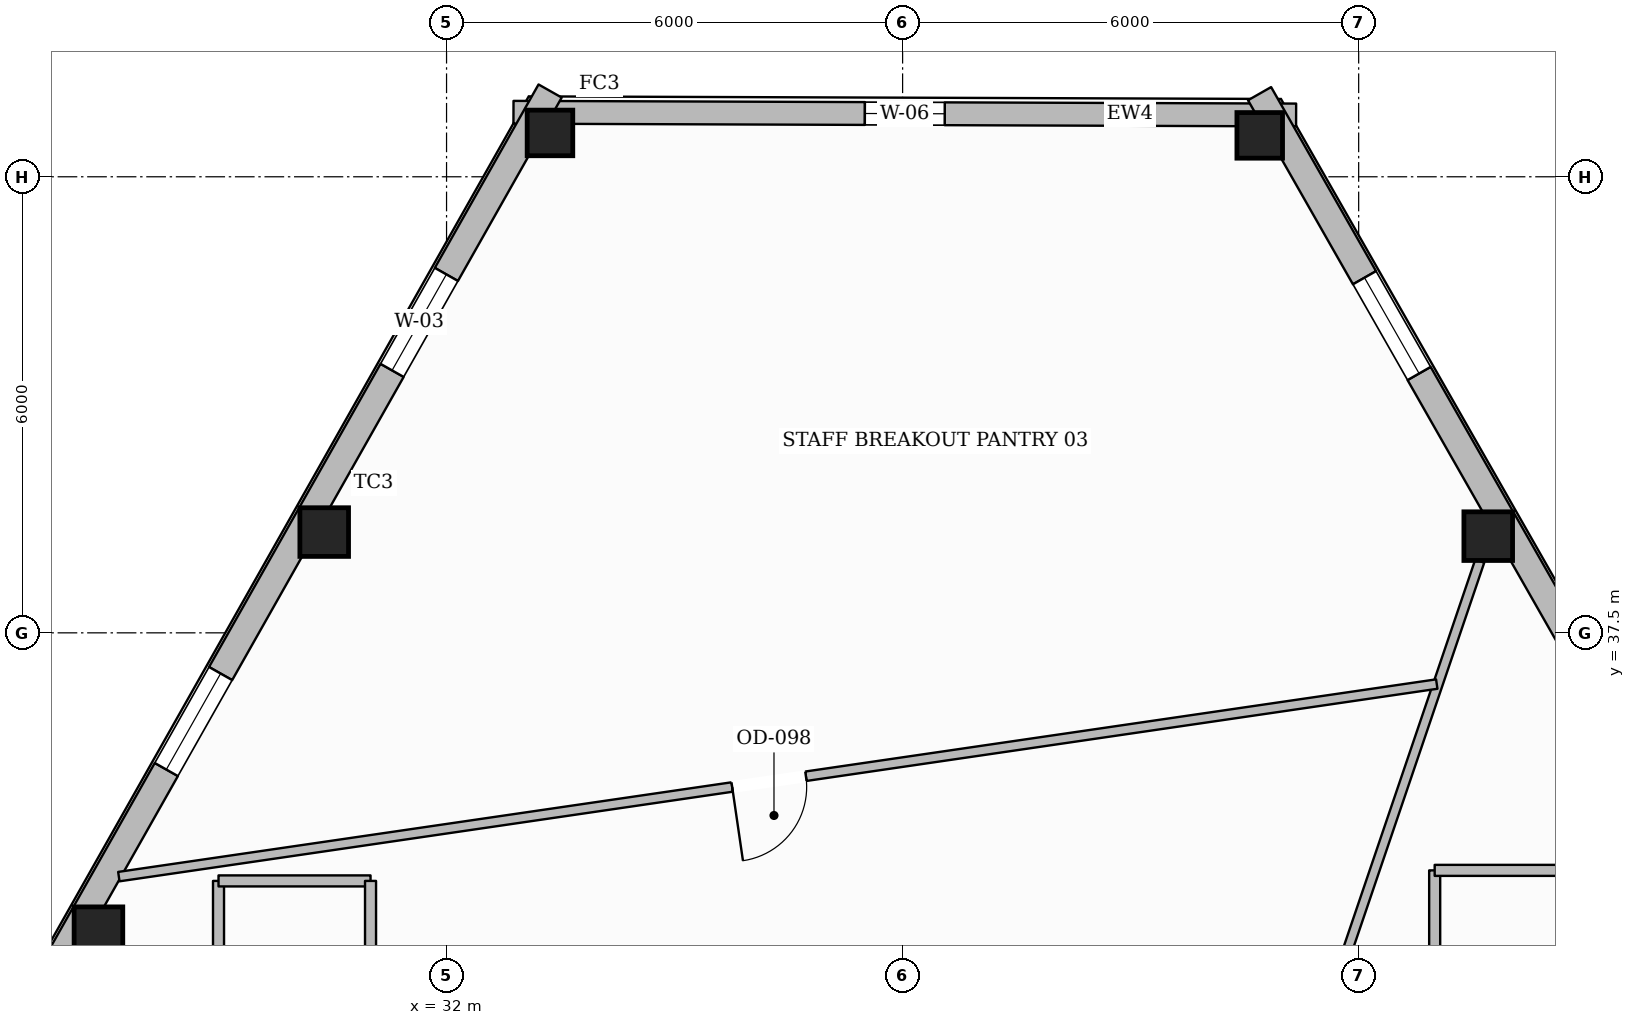
"""IFC4 building model, lengths in metres.
Left out: names, types, materials, properties, quantities, classifications, styles, units other than length and angle.
Written with IfcOpenShell. Run it as: python <this file> out.ifc"""

import sys

from ifc_helpers import new_model, si_unit, direction, frame, frame_2d, origin, origin_2d, place, context, subcontext, project, spatial, rectangle, hollow_rectangle, extrude, element, fill, save


model = new_model("IFC4")
c1 = context("Model", 3, precision=1e-05, world=origin(), true_north=direction((0.0, 1.0)))
c2 = subcontext(c1, "Body", "Model", "MODEL_VIEW")
j1 = project(units=[si_unit("LENGTHUNIT", "METRE"), si_unit("PLANEANGLEUNIT", "RADIAN")], contexts=[c1])
p1 = place(None, origin())
s1 = spatial("IfcSite", under=j1, at=p1, CompositionType="ELEMENT")
p2 = place(p1, origin())
s2 = spatial("IfcBuilding", under=s1, at=p2, CompositionType="ELEMENT")
p3 = place(p2, frame((0.0, 0.0, 168.85)))
s3 = spatial("IfcBuildingStorey", under=s2, at=p3, CompositionType="ELEMENT", Elevation=168.85)
p4 = place(p3, frame((33.361, 44.077, 0.0), z_axis=(0.0, 0.0, 1.0), x_axis=(1.0, 0.0, 0.0)))
e1 = element("IfcColumn", 1, at=p4, inside=s3, PredefinedType="COLUMN", context=c2, shape_type="SweptSolid", body=[
    extrude(hollow_rectangle(XDim=0.6, YDim=0.6, WallThickness=0.028, at=origin_2d()), origin(), (0.0, 0.0, 1.0), 3.6),
])
for number, where, z_axis, x_axis in (
    (2, (30.39, 38.826, 0.0), (0.0, 0.0, 1.0), (1.0, 0.0, 0.0)),
    (3, (27.42, 33.575, 0.0), (0.0, 0.0, 1.0), (1.0, 0.0, 0.0)),
    (4, (45.705, 38.772, 0.0), (0.0, 0.0, 1.0), (1.0, 0.0, 0.0)),
):
    element("IfcColumn", number, at=place(p3, frame(where, z_axis=z_axis, x_axis=x_axis)), inside=s3, PredefinedType="COLUMN", context=c2, shape_type="SweptSolid", body=[
        extrude(hollow_rectangle(XDim=0.64, YDim=0.64, WallThickness=0.028, at=origin_2d()), origin(), (0.0, 0.0, 1.0), 3.6),
    ])
p5 = place(p3, frame((42.698, 44.045, 0.0), z_axis=(0.0, 0.0, 1.0), x_axis=(1.0, 0.0, 0.0)))
e5 = element("IfcColumn", 5, at=p5, inside=s3, PredefinedType="COLUMN", context=c2, shape_type="SweptSolid", body=[
    extrude(hollow_rectangle(XDim=0.6, YDim=0.6, WallThickness=0.028, at=origin_2d()), origin(), (0.0, 0.0, 1.0), 3.6),
])
p6 = place(p3, frame((32.881, 44.348, 0.0), z_axis=(0.0, 0.0, 1.0), x_axis=(0.999994089659, -0.00343811692, 0.0)))
e6 = element("IfcWall", 6, at=p6, inside=s3, PredefinedType="STANDARD", context=c2, shape_type="SweptSolid", body=[
    extrude(rectangle(XDim=10.296, YDim=0.3, at=frame_2d((5.148, 0.0))), origin(), (0.0, 0.0, 1.0), 3.132),
])
p7 = place(p6, frame((4.623, 0.0, 0.65)))
e7 = element("IfcOpeningElement", 7, at=p7, cuts=e6, PredefinedType="OPENING", context=c2, shape_type="SweptSolid", body=[
    extrude(rectangle(XDim=1.05, YDim=1.7, at=frame_2d((0.525, 0.85))), frame((0.0, 0.16, 0.0), z_axis=(0.0, -1.0, 0.0), x_axis=(1.0, 0.0, 0.0)), (0.0, 0.0, 1.0), 0.32),
])
p8 = place(p3, frame((15.072, 12.292, 0.0), z_axis=(0.0, 0.0, 1.0), x_axis=(0.492336574501, 0.870404904288, 0.0)))
e8 = element("IfcWall", 8, at=p8, inside=s3, PredefinedType="STANDARD", context=c2, shape_type="SweptSolid", body=[
    extrude(rectangle(XDim=37.15, YDim=0.35, at=frame_2d((18.575, 0.0))), origin(), (0.0, 0.0, 1.0), 3.132),
])
p9 = place(p8, frame((8.888, 0.0, 0.0)))
e9 = element("IfcOpeningElement", 9, at=p9, cuts=e8, PredefinedType="OPENING", context=c2, shape_type="SweptSolid", body=[
    extrude(rectangle(XDim=1.0, YDim=2.2, at=frame_2d((0.5, 1.1))), frame((0.0, 0.185, 0.0), z_axis=(0.0, -1.0, 0.0), x_axis=(1.0, 0.0, 0.0)), (0.0, 0.0, 1.0), 0.37),
])
p10 = place(p8, frame((32.928, 0.0, 0.65)))
e10 = element("IfcOpeningElement", 10, at=p10, cuts=e8, PredefinedType="OPENING", context=c2, shape_type="SweptSolid", body=[
    extrude(rectangle(XDim=1.45, YDim=1.75, at=frame_2d((0.725, 0.875))), frame((0.0, 0.185, 0.0), z_axis=(0.0, -1.0, 0.0), x_axis=(1.0, 0.0, 0.0)), (0.0, 0.0, 1.0), 0.37),
])
p11 = place(p8, frame((26.895, 0.0, 0.65)))
e11 = element("IfcOpeningElement", 11, at=p11, cuts=e8, PredefinedType="OPENING", context=c2, shape_type="SweptSolid", body=[
    extrude(rectangle(XDim=1.45, YDim=1.75, at=frame_2d((0.725, 0.875))), frame((0.0, 0.185, 0.0), z_axis=(0.0, -1.0, 0.0), x_axis=(1.0, 0.0, 0.0)), (0.0, 0.0, 1.0), 0.37),
])
p12 = place(p8, frame((20.862, 0.0, 0.65)))
e12 = element("IfcOpeningElement", 12, at=p12, cuts=e8, PredefinedType="OPENING", context=c2, shape_type="SweptSolid", body=[
    extrude(rectangle(XDim=1.45, YDim=1.75, at=frame_2d((0.725, 0.875))), frame((0.0, 0.185, 0.0), z_axis=(0.0, -1.0, 0.0), x_axis=(1.0, 0.0, 0.0)), (0.0, 0.0, 1.0), 0.37),
])
p13 = place(p8, frame((2.764, 0.0, 0.65)))
e13 = element("IfcOpeningElement", 13, at=p13, cuts=e8, PredefinedType="OPENING", context=c2, shape_type="SweptSolid", body=[
    extrude(rectangle(XDim=1.45, YDim=1.75, at=frame_2d((0.725, 0.875))), frame((0.0, 0.185, 0.0), z_axis=(0.0, -1.0, 0.0), x_axis=(1.0, 0.0, 0.0)), (0.0, 0.0, 1.0), 0.37),
])
p14 = place(p3, frame((42.696, 44.593, 0.0), z_axis=(0.0, 0.0, 1.0), x_axis=(0.495321099056, -0.868709968188, 0.0)))
e14 = element("IfcWall", 14, at=p14, inside=s3, PredefinedType="STANDARD", context=c2, shape_type="SweptSolid", body=[
    extrude(rectangle(XDim=37.366, YDim=0.35, at=frame_2d((18.683, 0.0))), origin(), (0.0, 0.0, 1.0), 3.132),
])
p15 = place(p14, frame((33.134, 0.0, 0.65)))
e15 = element("IfcOpeningElement", 15, at=p15, cuts=e14, PredefinedType="OPENING", context=c2, shape_type="SweptSolid", body=[
    extrude(rectangle(XDim=1.45, YDim=1.75, at=frame_2d((0.725, 0.875))), frame((0.0, 0.185, 0.0), z_axis=(0.0, -1.0, 0.0), x_axis=(1.0, 0.0, 0.0)), (0.0, 0.0, 1.0), 0.37),
])
p16 = place(p14, frame((27.065, 0.0, 0.65)))
e16 = element("IfcOpeningElement", 16, at=p16, cuts=e14, PredefinedType="OPENING", context=c2, shape_type="SweptSolid", body=[
    extrude(rectangle(XDim=1.45, YDim=1.75, at=frame_2d((0.725, 0.875))), frame((0.0, 0.185, 0.0), z_axis=(0.0, -1.0, 0.0), x_axis=(1.0, 0.0, 0.0)), (0.0, 0.0, 1.0), 0.37),
])
p17 = place(p14, frame((20.995, 0.0, 0.65)))
e17 = element("IfcOpeningElement", 17, at=p17, cuts=e14, PredefinedType="OPENING", context=c2, shape_type="SweptSolid", body=[
    extrude(rectangle(XDim=1.45, YDim=1.75, at=frame_2d((0.725, 0.875))), frame((0.0, 0.185, 0.0), z_axis=(0.0, -1.0, 0.0), x_axis=(1.0, 0.0, 0.0)), (0.0, 0.0, 1.0), 0.37),
])
p18 = place(p14, frame((8.857, 0.0, 0.65)))
e18 = element("IfcOpeningElement", 18, at=p18, cuts=e14, PredefinedType="OPENING", context=c2, shape_type="SweptSolid", body=[
    extrude(rectangle(XDim=1.45, YDim=1.75, at=frame_2d((0.725, 0.875))), frame((0.0, 0.185, 0.0), z_axis=(0.0, -1.0, 0.0), x_axis=(1.0, 0.0, 0.0)), (0.0, 0.0, 1.0), 0.37),
])
p19 = place(p14, frame((2.787, 0.0, 0.65)))
e19 = element("IfcOpeningElement", 19, at=p19, cuts=e14, PredefinedType="OPENING", context=c2, shape_type="SweptSolid", body=[
    extrude(rectangle(XDim=1.45, YDim=1.75, at=frame_2d((0.725, 0.875))), frame((0.0, 0.185, 0.0), z_axis=(0.0, -1.0, 0.0), x_axis=(1.0, 0.0, 0.0)), (0.0, 0.0, 1.0), 0.37),
])
p20 = place(p3, frame((29.0, 25.02, 0.0), z_axis=(0.0, 0.0, 1.0), x_axis=(0.0, 1.0, 0.0)))
e20 = element("IfcWall", 20, at=p20, inside=s3, PredefinedType="PARTITIONING", context=c2, shape_type="SweptSolid", body=[
    extrude(rectangle(XDim=9.216, YDim=0.145, at=frame_2d((4.608, 0.0))), origin(), (0.0, 0.0, 1.0), 3.6),
])
p21 = place(p3, frame((29.0, 34.236, 0.0), z_axis=(0.0, 0.0, 1.0), x_axis=(1.0, 0.0, 0.0)))
e21 = element("IfcWall", 21, at=p21, inside=s3, PredefinedType="PARTITIONING", context=c2, shape_type="SweptSolid", body=[
    extrude(rectangle(XDim=2.0, YDim=0.145, at=frame_2d((1.0, 0.0))), origin(), (0.0, 0.0, 1.0), 3.6),
])
p22 = place(p3, frame((31.0, 34.236, 0.0), z_axis=(0.0, 0.0, 1.0), x_axis=(0.0, -1.0, 0.0)))
e22 = element("IfcWall", 22, at=p22, inside=s3, PredefinedType="PARTITIONING", context=c2, shape_type="SweptSolid", body=[
    extrude(rectangle(XDim=9.216, YDim=0.145, at=frame_2d((4.608, 0.0))), origin(), (0.0, 0.0, 1.0), 3.6),
])
p23 = place(p3, frame((45.0, 25.02, 0.0), z_axis=(0.0, 0.0, 1.0), x_axis=(0.0, 1.0, 0.0)))
e23 = element("IfcWall", 23, at=p23, inside=s3, PredefinedType="PARTITIONING", context=c2, shape_type="SweptSolid", body=[
    extrude(rectangle(XDim=9.355, YDim=0.145, at=frame_2d((4.677, 0.0))), origin(), (0.0, 0.0, 1.0), 3.6),
])
p24 = place(p23, frame((3.978, 0.0, 0.0)))
e24 = element("IfcOpeningElement", 24, at=p24, cuts=e23, PredefinedType="OPENING", context=c2, shape_type="SweptSolid", body=[
    extrude(rectangle(XDim=1.4, YDim=2.2, at=frame_2d((0.7, 1.1))), frame((0.0, 0.083, 0.0), z_axis=(0.0, -1.0, 0.0), x_axis=(1.0, 0.0, 0.0)), (0.0, 0.0, 1.0), 0.165),
])
p25 = place(p3, frame((45.0, 34.375, 0.0), z_axis=(0.0, 0.0, 1.0), x_axis=(1.0, 0.0, 0.0)))
e25 = element("IfcWall", 25, at=p25, inside=s3, PredefinedType="PARTITIONING", context=c2, shape_type="SweptSolid", body=[
    extrude(rectangle(XDim=2.0, YDim=0.145, at=frame_2d((1.0, 0.0))), origin(), (0.0, 0.0, 1.0), 3.6),
])
p26 = place(p3, frame((43.447, 32.128, 0.0), z_axis=(0.0, 0.0, 1.0), x_axis=(0.321734106444, 0.946830061178, 0.0)))
e26 = element("IfcWall", 26, at=p26, inside=s3, PredefinedType="PARTITIONING", context=c2, shape_type="SweptSolid", body=[
    extrude(rectangle(XDim=6.671, YDim=0.125, at=frame_2d((3.335, 0.0))), origin(), (0.0, 0.0, 1.0), 3.6),
])
p27 = place(p3, frame((45.027, 36.826, 0.0), z_axis=(0.0, 0.0, 1.0), x_axis=(-0.989495020957, -0.144566951625, 0.0)))
e27 = element("IfcWall", 27, at=p27, inside=s3, PredefinedType="PARTITIONING", context=c2, shape_type="SweptSolid", body=[
    extrude(rectangle(XDim=17.523, YDim=0.125, at=frame_2d((8.761, 0.0))), origin(), (0.0, 0.0, 1.0), 3.6),
])
p28 = place(p27, frame((8.388, 0.0, 0.0)))
e28 = element("IfcOpeningElement", 28, at=p28, cuts=e27, PredefinedType="OPENING", context=c2, shape_type="SweptSolid", body=[
    extrude(rectangle(XDim=0.98, YDim=2.15, at=frame_2d((0.49, 1.075))), frame((0.0, 0.073, 0.0), z_axis=(0.0, -1.0, 0.0), x_axis=(1.0, 0.0, 0.0)), (0.0, 0.0, 1.0), 0.145),
])
p29 = place(p10, origin())
e29 = element("IfcWindow", 29, at=p29, inside=s3, PartitioningType="SINGLE_PANEL", PredefinedType="WINDOW", context=c2, shape_type="SweptSolid", body=[
    extrude(rectangle(XDim=1.45, YDim=1.75, at=frame_2d((0.725, 0.875))), frame((0.0, 0.03, 0.0), z_axis=(0.0, -1.0, 0.0), x_axis=(1.0, 0.0, 0.0)), (0.0, 0.0, 1.0), 0.06),
])
fill(e10, e29)
p30 = place(p11, origin())
e30 = element("IfcWindow", 30, at=p30, inside=s3, PartitioningType="SINGLE_PANEL", PredefinedType="WINDOW", context=c2, shape_type="SweptSolid", body=[
    extrude(rectangle(XDim=1.45, YDim=1.75, at=frame_2d((0.725, 0.875))), frame((0.0, 0.03, 0.0), z_axis=(0.0, -1.0, 0.0), x_axis=(1.0, 0.0, 0.0)), (0.0, 0.0, 1.0), 0.06),
])
fill(e11, e30)
p31 = place(p19, origin())
e31 = element("IfcWindow", 31, at=p31, inside=s3, PartitioningType="SINGLE_PANEL", PredefinedType="WINDOW", context=c2, shape_type="SweptSolid", body=[
    extrude(rectangle(XDim=1.45, YDim=1.75, at=frame_2d((0.725, 0.875))), frame((0.0, 0.03, 0.0), z_axis=(0.0, -1.0, 0.0), x_axis=(1.0, 0.0, 0.0)), (0.0, 0.0, 1.0), 0.06),
])
fill(e19, e31)
p32 = place(p7, origin())
e32 = element("IfcWindow", 32, at=p32, inside=s3, PartitioningType="SINGLE_PANEL", PredefinedType="WINDOW", context=c2, shape_type="SweptSolid", body=[
    extrude(rectangle(XDim=1.05, YDim=1.7, at=frame_2d((0.525, 0.85))), frame((0.0, 0.03, 0.0), z_axis=(0.0, -1.0, 0.0), x_axis=(1.0, 0.0, 0.0)), (0.0, 0.0, 1.0), 0.06),
])
fill(e7, e32)
p33 = place(p28, origin())
e33 = element("IfcDoor", 33, at=p33, inside=s3, OperationType="SINGLE_SWING_RIGHT", PredefinedType="DOOR", context=c2, shape_type="SweptSolid", body=[
    extrude(rectangle(XDim=0.98, YDim=2.15, at=frame_2d((0.49, 1.075))), frame((0.0, 0.025, 0.0), z_axis=(0.0, -1.0, 0.0), x_axis=(1.0, 0.0, 0.0)), (0.0, 0.0, 1.0), 0.05),
])
fill(e28, e33)
save(model, sys.argv[1])
